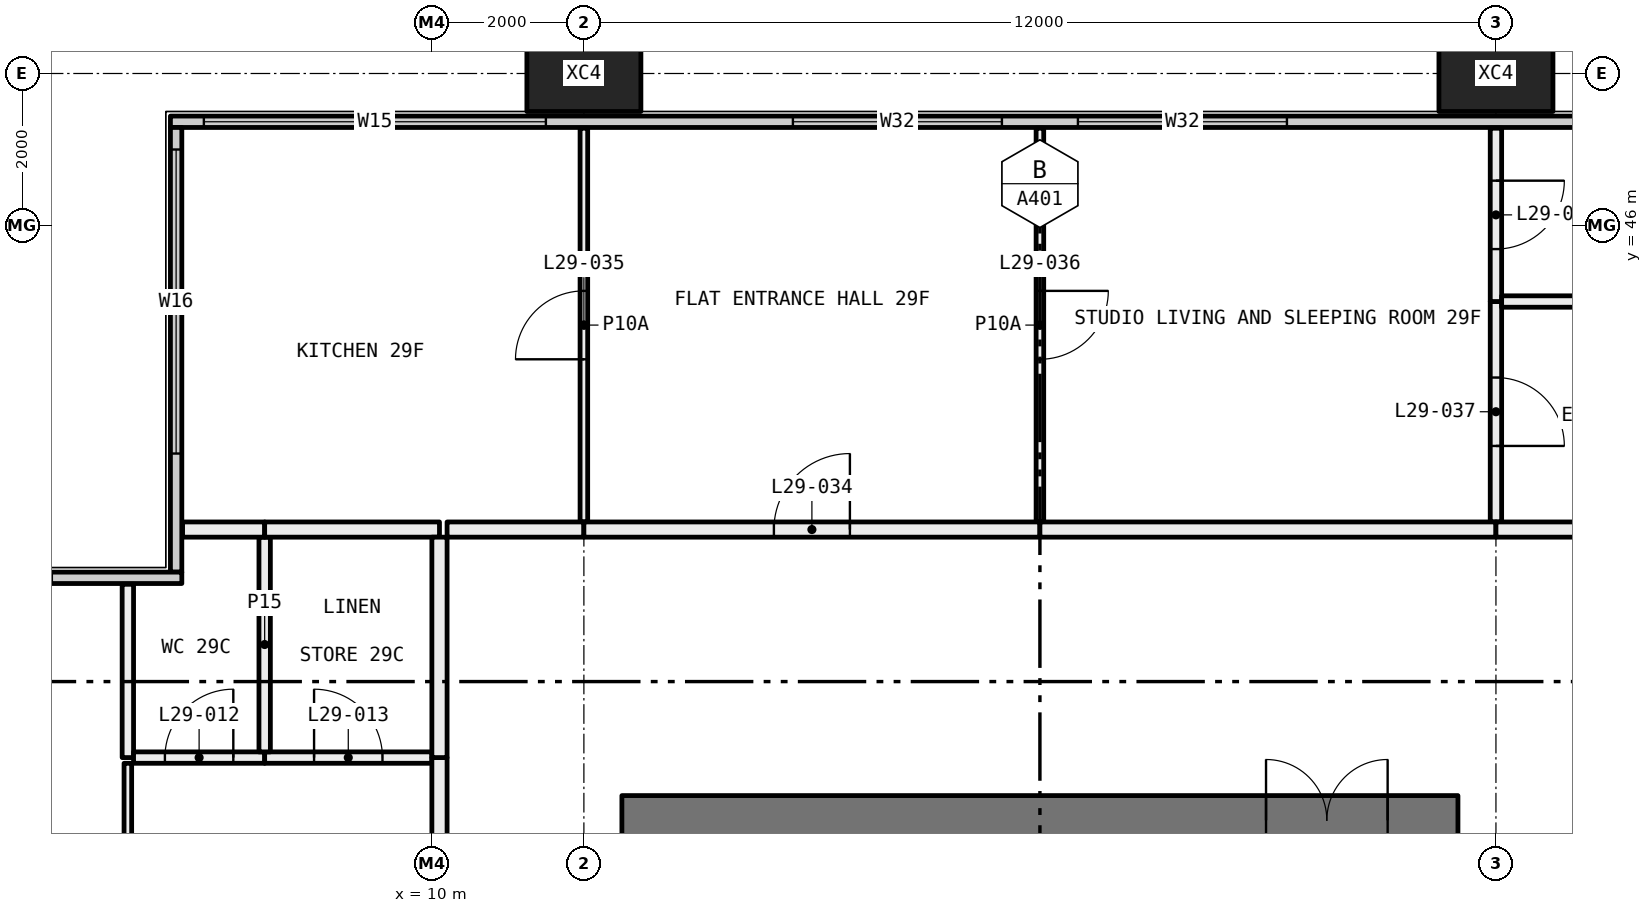
"""IFC4 building model, lengths in metres.
Left out: names, types, materials, properties, quantities, classifications, styles, units other than length and angle.
Written with IfcOpenShell. Run it as: python <this file> out.ifc"""

import sys

from ifc_helpers import new_model, si_unit, direction, frame, frame_2d, origin, origin_2d, place, context, subcontext, project, spatial, rectangle, hollow_rectangle, extrude, element, fill, save


model = new_model("IFC4")
c1 = context("Model", 3, precision=1e-05, world=origin(), true_north=direction((0.0, 1.0)))
c2 = subcontext(c1, "Body", "Model", "MODEL_VIEW")
j1 = project(units=[si_unit("LENGTHUNIT", "METRE"), si_unit("PLANEANGLEUNIT", "RADIAN")], contexts=[c1])
p1 = place(None, origin())
s1 = spatial("IfcSite", under=j1, at=p1, CompositionType="ELEMENT")
p2 = place(p1, origin())
s2 = spatial("IfcBuilding", under=s1, at=p2, CompositionType="ELEMENT")
p3 = place(p2, frame((0.0, 0.0, 113.85)))
s3 = spatial("IfcBuildingStorey", under=s2, at=p3, CompositionType="ELEMENT", Elevation=113.85)
for number, where, z_axis, x_axis in (
    (1, (12.0, 48.0, -0.4), (0.0, 0.0, 1.0), (1.0, 0.0, 0.0)),
    (2, (24.0, 48.0, -0.4), (0.0, 0.0, 1.0), (1.0, 0.0, 0.0)),
):
    element("IfcColumn", number, at=place(p3, frame(where, z_axis=z_axis, x_axis=x_axis)), inside=s3, PredefinedType="COLUMN", context=c2, shape_type="SweptSolid", body=[
        extrude(hollow_rectangle(XDim=1.5, YDim=1.0, WallThickness=0.06, at=origin_2d()), origin(), (0.0, 0.0, 1.0), 3.45),
    ])
p4 = place(p3, frame((6.56, 47.365, 0.0), z_axis=(0.0, 0.0, 1.0), x_axis=(1.0, 0.0, 0.0)))
e3 = element("IfcWall", 3, at=p4, inside=s3, PredefinedType="ELEMENTEDWALL", context=c2, shape_type="SweptSolid", body=[
    extrude(rectangle(XDim=58.88, YDim=0.15, at=frame_2d((29.44, 0.0))), origin(), (0.0, 0.0, 1.0), 3.05),
])
p5 = place(p4, frame((0.44, 0.0, 0.45)))
e4 = element("IfcOpeningElement", 4, at=p5, cuts=e3, PredefinedType="OPENING", context=c2, shape_type="SweptSolid", body=[
    extrude(rectangle(XDim=4.5, YDim=2.55, at=frame_2d((2.25, 1.275))), frame((0.0, 0.085, 0.0), z_axis=(0.0, -1.0, 0.0), x_axis=(1.0, 0.0, 0.0)), (0.0, 0.0, 1.0), 0.17),
])
p6 = place(p4, frame((8.19, 0.0, 0.45)))
e5 = element("IfcOpeningElement", 5, at=p6, cuts=e3, PredefinedType="OPENING", context=c2, shape_type="SweptSolid", body=[
    extrude(rectangle(XDim=2.75, YDim=2.55, at=frame_2d((1.375, 1.275))), frame((0.0, 0.085, 0.0), z_axis=(0.0, -1.0, 0.0), x_axis=(1.0, 0.0, 0.0)), (0.0, 0.0, 1.0), 0.17),
])
p7 = place(p4, frame((11.94, 0.0, 0.45)))
e6 = element("IfcOpeningElement", 6, at=p7, cuts=e3, PredefinedType="OPENING", context=c2, shape_type="SweptSolid", body=[
    extrude(rectangle(XDim=2.75, YDim=2.55, at=frame_2d((1.375, 1.275))), frame((0.0, 0.085, 0.0), z_axis=(0.0, -1.0, 0.0), x_axis=(1.0, 0.0, 0.0)), (0.0, 0.0, 1.0), 0.17),
])
p8 = place(p4, frame((20.19, 0.0, 0.45)))
e7 = element("IfcOpeningElement", 7, at=p8, cuts=e3, PredefinedType="OPENING", context=c2, shape_type="SweptSolid", body=[
    extrude(rectangle(XDim=2.75, YDim=2.55, at=frame_2d((1.375, 1.275))), frame((0.0, 0.085, 0.0), z_axis=(0.0, -1.0, 0.0), x_axis=(1.0, 0.0, 0.0)), (0.0, 0.0, 1.0), 0.17),
])
p9 = place(p4, frame((23.94, 0.0, 0.45)))
e8 = element("IfcOpeningElement", 8, at=p9, cuts=e3, PredefinedType="OPENING", context=c2, shape_type="SweptSolid", body=[
    extrude(rectangle(XDim=2.0, YDim=2.55, at=frame_2d((1.0, 1.275))), frame((0.0, 0.085, 0.0), z_axis=(0.0, -1.0, 0.0), x_axis=(1.0, 0.0, 0.0)), (0.0, 0.0, 1.0), 0.17),
])
p10 = place(p4, frame((32.19, 0.0, 0.45)))
e9 = element("IfcOpeningElement", 9, at=p10, cuts=e3, PredefinedType="OPENING", context=c2, shape_type="SweptSolid", body=[
    extrude(rectangle(XDim=2.75, YDim=2.55, at=frame_2d((1.375, 1.275))), frame((0.0, 0.085, 0.0), z_axis=(0.0, -1.0, 0.0), x_axis=(1.0, 0.0, 0.0)), (0.0, 0.0, 1.0), 0.17),
])
p11 = place(p4, frame((35.94, 0.0, 0.45)))
e10 = element("IfcOpeningElement", 10, at=p11, cuts=e3, PredefinedType="OPENING", context=c2, shape_type="SweptSolid", body=[
    extrude(rectangle(XDim=2.75, YDim=2.55, at=frame_2d((1.375, 1.275))), frame((0.0, 0.085, 0.0), z_axis=(0.0, -1.0, 0.0), x_axis=(1.0, 0.0, 0.0)), (0.0, 0.0, 1.0), 0.17),
])
p12 = place(p4, frame((44.19, 0.0, 0.45)))
e11 = element("IfcOpeningElement", 11, at=p12, cuts=e3, PredefinedType="OPENING", context=c2, shape_type="SweptSolid", body=[
    extrude(rectangle(XDim=2.75, YDim=2.55, at=frame_2d((1.375, 1.275))), frame((0.0, 0.085, 0.0), z_axis=(0.0, -1.0, 0.0), x_axis=(1.0, 0.0, 0.0)), (0.0, 0.0, 1.0), 0.17),
])
p13 = place(p4, frame((47.94, 0.0, 0.45)))
e12 = element("IfcOpeningElement", 12, at=p13, cuts=e3, PredefinedType="OPENING", context=c2, shape_type="SweptSolid", body=[
    extrude(rectangle(XDim=2.0, YDim=2.55, at=frame_2d((1.0, 1.275))), frame((0.0, 0.085, 0.0), z_axis=(0.0, -1.0, 0.0), x_axis=(1.0, 0.0, 0.0)), (0.0, 0.0, 1.0), 0.17),
])
p14 = place(p4, frame((53.94, 0.0, 0.45)))
e13 = element("IfcOpeningElement", 13, at=p14, cuts=e3, PredefinedType="OPENING", context=c2, shape_type="SweptSolid", body=[
    extrude(rectangle(XDim=4.5, YDim=2.55, at=frame_2d((2.25, 1.275))), frame((0.0, 0.085, 0.0), z_axis=(0.0, -1.0, 0.0), x_axis=(1.0, 0.0, 0.0)), (0.0, 0.0, 1.0), 0.17),
])
p15 = place(p3, frame((6.635, 41.44, 0.0), z_axis=(0.0, 0.0, 1.0), x_axis=(0.0, 1.0, 0.0)))
e14 = element("IfcWall", 14, at=p15, inside=s3, PredefinedType="ELEMENTEDWALL", context=c2, shape_type="SweptSolid", body=[
    extrude(rectangle(XDim=5.85, YDim=0.15, at=frame_2d((2.925, 0.0))), origin(), (0.0, 0.0, 1.0), 3.05),
])
p16 = place(p15, frame((1.56, 0.0, 0.45)))
e15 = element("IfcOpeningElement", 15, at=p16, cuts=e14, PredefinedType="OPENING", context=c2, shape_type="SweptSolid", body=[
    extrude(rectangle(XDim=4.0, YDim=2.55, at=frame_2d((2.0, 1.275))), frame((0.0, 0.085, 0.0), z_axis=(0.0, -1.0, 0.0), x_axis=(1.0, 0.0, 0.0)), (0.0, 0.0, 1.0), 0.17),
])
p17 = place(p3, frame((0.56, 41.365, 0.0), z_axis=(0.0, 0.0, 1.0), x_axis=(1.0, 0.0, 0.0)))
e16 = element("IfcWall", 16, at=p17, inside=s3, PredefinedType="ELEMENTEDWALL", context=c2, shape_type="SweptSolid", body=[
    extrude(rectangle(XDim=6.15, YDim=0.15, at=frame_2d((3.075, 0.0))), origin(), (0.0, 0.0, 1.0), 3.05),
])
p18 = place(p17, frame((0.44, 0.0, 0.45)))
e17 = element("IfcOpeningElement", 17, at=p18, cuts=e16, PredefinedType="OPENING", context=c2, shape_type="SweptSolid", body=[
    extrude(rectangle(XDim=4.0, YDim=2.55, at=frame_2d((2.0, 1.275))), frame((0.0, 0.085, 0.0), z_axis=(0.0, -1.0, 0.0), x_axis=(1.0, 0.0, 0.0)), (0.0, 0.0, 1.0), 0.17),
])
p19 = place(p3, frame((6.0, 36.05, 0.0), z_axis=(0.0, 0.0, 1.0), x_axis=(0.0, 1.0, 0.0)))
e18 = element("IfcWall", 18, at=p19, inside=s3, PredefinedType="PARTITIONING", context=c2, shape_type="SweptSolid", body=[
    extrude(rectangle(XDim=2.875, YDim=0.1, at=frame_2d((1.438, 0.0))), origin(), (0.0, 0.0, 1.0), 2.45),
])
p20 = place(p3, frame((6.0, 39.0, 0.0), z_axis=(0.0, 0.0, 1.0), x_axis=(0.0, 1.0, 0.0)))
e19 = element("IfcWall", 19, at=p20, inside=s3, PredefinedType="PARTITIONING", context=c2, shape_type="SweptSolid", body=[
    extrude(rectangle(XDim=2.28, YDim=0.15, at=frame_2d((1.14, 0.0))), origin(), (0.0, 0.0, 1.0), 3.05),
])
p21 = place(p3, frame((7.8, 39.0, 0.0), z_axis=(0.0, 0.0, 1.0), x_axis=(-1.0, 0.0, 0.0)))
e20 = element("IfcWall", 20, at=p21, inside=s3, PredefinedType="PARTITIONING", context=c2, shape_type="SweptSolid", body=[
    extrude(rectangle(XDim=1.725, YDim=0.15, at=frame_2d((0.863, 0.0))), origin(), (0.0, 0.0, 1.0), 3.05),
])
p22 = place(p21, frame((0.413, 0.0, 0.0)))
e21 = element("IfcOpeningElement", 21, at=p22, cuts=e20, PredefinedType="OPENING", context=c2, shape_type="SweptSolid", body=[
    extrude(rectangle(XDim=0.9, YDim=2.1, at=frame_2d((0.45, 1.05))), frame((0.0, 0.085, 0.0), z_axis=(0.0, -1.0, 0.0), x_axis=(1.0, 0.0, 0.0)), (0.0, 0.0, 1.0), 0.17),
])
p23 = place(p3, frame((10.0, 39.0, 0.0), z_axis=(0.0, 0.0, 1.0), x_axis=(-1.0, 0.0, 0.0)))
e22 = element("IfcWall", 22, at=p23, inside=s3, PredefinedType="PARTITIONING", context=c2, shape_type="SweptSolid", body=[
    extrude(rectangle(XDim=2.2, YDim=0.15, at=frame_2d((1.1, 0.0))), origin(), (0.0, 0.0, 1.0), 3.05),
])
p24 = place(p23, frame((0.65, 0.0, 0.0)))
e23 = element("IfcOpeningElement", 23, at=p24, cuts=e22, PredefinedType="OPENING", context=c2, shape_type="SweptSolid", body=[
    extrude(rectangle(XDim=0.9, YDim=2.1, at=frame_2d((0.45, 1.05))), frame((0.0, 0.085, 0.0), z_axis=(0.0, -1.0, 0.0), x_axis=(1.0, 0.0, 0.0)), (0.0, 0.0, 1.0), 0.17),
])
p25 = place(p3, frame((10.1, 36.1, 0.0), z_axis=(0.0, 0.0, 1.0), x_axis=(0.0, 1.0, 0.0)))
e24 = element("IfcWall", 24, at=p25, inside=s3, PredefinedType="PARTITIONING", context=c2, shape_type="SweptSolid", body=[
    extrude(rectangle(XDim=2.9, YDim=0.2, at=frame_2d((1.45, 0.0))), origin(), (0.0, 0.0, 1.0), 3.05),
])
p26 = place(p3, frame((7.8, 39.075, 0.0), z_axis=(0.0, 0.0, 1.0), x_axis=(0.0, 1.0, 0.0)))
e25 = element("IfcWall", 25, at=p26, inside=s3, PredefinedType="PARTITIONING", context=c2, shape_type="SweptSolid", body=[
    extrude(rectangle(XDim=2.825, YDim=0.15, at=frame_2d((1.413, 0.0))), origin(), (0.0, 0.0, 1.0), 3.05),
])
p27 = place(p3, frame((7.8, 42.0, 0.0), z_axis=(0.0, 0.0, 1.0), x_axis=(-1.0, 0.0, 0.0)))
e26 = element("IfcWall", 26, at=p27, inside=s3, PredefinedType="PARTITIONING", context=c2, shape_type="SweptSolid", body=[
    extrude(rectangle(XDim=1.08, YDim=0.2, at=frame_2d((0.54, 0.0))), origin(), (0.0, 0.0, 1.0), 3.05),
])
p28 = place(p3, frame((10.1, 42.0, 0.0), z_axis=(0.0, 0.0, 1.0), x_axis=(-1.0, 0.0, 0.0)))
e27 = element("IfcWall", 27, at=p28, inside=s3, PredefinedType="PARTITIONING", context=c2, shape_type="SweptSolid", body=[
    extrude(rectangle(XDim=2.3, YDim=0.2, at=frame_2d((1.15, 0.0))), origin(), (0.0, 0.0, 1.0), 3.05),
])
p29 = place(p3, frame((10.1, 39.0, 0.0), z_axis=(0.0, 0.0, 1.0), x_axis=(0.0, 1.0, 0.0)))
e28 = element("IfcWall", 28, at=p29, inside=s3, PredefinedType="PARTITIONING", context=c2, shape_type="SweptSolid", body=[
    extrude(rectangle(XDim=2.9, YDim=0.2, at=frame_2d((1.45, 0.0))), origin(), (0.0, 0.0, 1.0), 3.05),
])
p30 = place(p3, frame((12.0, 42.1, 0.0), z_axis=(0.0, 0.0, 1.0), x_axis=(0.0, 1.0, 0.0)))
e29 = element("IfcWall", 29, at=p30, inside=s3, PredefinedType="PARTITIONING", context=c2, shape_type="SweptSolid", body=[
    extrude(rectangle(XDim=5.18, YDim=0.1, at=frame_2d((2.59, 0.0))), origin(), (0.0, 0.0, 1.0), 3.05),
])
p31 = place(p30, frame((2.14, 0.0, 0.0)))
e30 = element("IfcOpeningElement", 30, at=p31, cuts=e29, PredefinedType="OPENING", context=c2, shape_type="SweptSolid", body=[
    extrude(rectangle(XDim=0.9, YDim=2.1, at=frame_2d((0.45, 1.05))), frame((0.0, 0.06, 0.0), z_axis=(0.0, -1.0, 0.0), x_axis=(1.0, 0.0, 0.0)), (0.0, 0.0, 1.0), 0.12),
])
p32 = place(p3, frame((10.2, 42.0, 0.0), z_axis=(0.0, 0.0, 1.0), x_axis=(1.0, 0.0, 0.0)))
e31 = element("IfcWall", 31, at=p32, inside=s3, PredefinedType="PARTITIONING", context=c2, shape_type="SweptSolid", body=[
    extrude(rectangle(XDim=1.8, YDim=0.2, at=frame_2d((0.9, 0.0))), origin(), (0.0, 0.0, 1.0), 3.05),
])
p33 = place(p3, frame((18.0, 42.1, 0.0), z_axis=(0.0, 0.0, 1.0), x_axis=(0.0, 1.0, 0.0)))
e32 = element("IfcWall", 32, at=p33, inside=s3, PredefinedType="PARTITIONING", context=c2, shape_type="SweptSolid", body=[
    extrude(rectangle(XDim=5.18, YDim=0.1, at=frame_2d((2.59, 0.0))), origin(), (0.0, 0.0, 1.0), 3.05),
])
p34 = place(p33, frame((2.14, 0.0, 0.0)))
e33 = element("IfcOpeningElement", 33, at=p34, cuts=e32, PredefinedType="OPENING", context=c2, shape_type="SweptSolid", body=[
    extrude(rectangle(XDim=0.9, YDim=2.1, at=frame_2d((0.45, 1.05))), frame((0.0, 0.06, 0.0), z_axis=(0.0, -1.0, 0.0), x_axis=(1.0, 0.0, 0.0)), (0.0, 0.0, 1.0), 0.12),
])
p35 = place(p3, frame((12.0, 42.0, 0.0), z_axis=(0.0, 0.0, 1.0), x_axis=(1.0, 0.0, 0.0)))
e34 = element("IfcWall", 34, at=p35, inside=s3, PredefinedType="PARTITIONING", context=c2, shape_type="SweptSolid", body=[
    extrude(rectangle(XDim=6.0, YDim=0.2, at=frame_2d((3.0, 0.0))), origin(), (0.0, 0.0, 1.0), 3.05),
])
p36 = place(p35, frame((2.5, 0.0, 0.0)))
e35 = element("IfcOpeningElement", 35, at=p36, cuts=e34, PredefinedType="OPENING", context=c2, shape_type="SweptSolid", body=[
    extrude(rectangle(XDim=1.0, YDim=2.1, at=frame_2d((0.5, 1.05))), frame((0.0, 0.11, 0.0), z_axis=(0.0, -1.0, 0.0), x_axis=(1.0, 0.0, 0.0)), (0.0, 0.0, 1.0), 0.22),
])
p37 = place(p3, frame((24.0, 42.1, 0.0), z_axis=(0.0, 0.0, 1.0), x_axis=(0.0, 1.0, 0.0)))
e36 = element("IfcWall", 36, at=p37, inside=s3, PredefinedType="PARTITIONING", context=c2, shape_type="SweptSolid", body=[
    extrude(rectangle(XDim=2.9, YDim=0.15, at=frame_2d((1.45, 0.0))), origin(), (0.0, 0.0, 1.0), 3.05),
])
p38 = place(p37, frame((1.0, 0.0, 0.0)))
e37 = element("IfcOpeningElement", 37, at=p38, cuts=e36, PredefinedType="OPENING", context=c2, shape_type="SweptSolid", body=[
    extrude(rectangle(XDim=0.9, YDim=2.1, at=frame_2d((0.45, 1.05))), frame((0.0, 0.085, 0.0), z_axis=(0.0, -1.0, 0.0), x_axis=(1.0, 0.0, 0.0)), (0.0, 0.0, 1.0), 0.17),
])
p39 = place(p3, frame((24.0, 45.0, 0.0), z_axis=(0.0, 0.0, 1.0), x_axis=(0.0, 1.0, 0.0)))
e38 = element("IfcWall", 38, at=p39, inside=s3, PredefinedType="PARTITIONING", context=c2, shape_type="SweptSolid", body=[
    extrude(rectangle(XDim=2.28, YDim=0.15, at=frame_2d((1.14, 0.0))), origin(), (0.0, 0.0, 1.0), 3.05),
])
p40 = place(p39, frame((0.69, 0.0, 0.0)))
e39 = element("IfcOpeningElement", 39, at=p40, cuts=e38, PredefinedType="OPENING", context=c2, shape_type="SweptSolid", body=[
    extrude(rectangle(XDim=0.9, YDim=2.1, at=frame_2d((0.45, 1.05))), frame((0.0, 0.085, 0.0), z_axis=(0.0, -1.0, 0.0), x_axis=(1.0, 0.0, 0.0)), (0.0, 0.0, 1.0), 0.17),
])
p41 = place(p3, frame((18.0, 42.0, 0.0), z_axis=(0.0, 0.0, 1.0), x_axis=(1.0, 0.0, 0.0)))
e40 = element("IfcWall", 40, at=p41, inside=s3, PredefinedType="PARTITIONING", context=c2, shape_type="SweptSolid", body=[
    extrude(rectangle(XDim=6.0, YDim=0.2, at=frame_2d((3.0, 0.0))), origin(), (0.0, 0.0, 1.0), 3.05),
])
p42 = place(p3, frame((29.9, 45.0, 0.0), z_axis=(0.0, 0.0, 1.0), x_axis=(-1.0, 0.0, 0.0)))
e41 = element("IfcWall", 41, at=p42, inside=s3, PredefinedType="PARTITIONING", context=c2, shape_type="SweptSolid", body=[
    extrude(rectangle(XDim=5.825, YDim=0.15, at=frame_2d((2.913, 0.0))), origin(), (0.0, 0.0, 1.0), 3.05),
])
p43 = place(p3, frame((24.0, 42.0, 0.0), z_axis=(0.0, 0.0, 1.0), x_axis=(1.0, 0.0, 0.0)))
e42 = element("IfcWall", 42, at=p43, inside=s3, PredefinedType="PARTITIONING", context=c2, shape_type="SweptSolid", body=[
    extrude(rectangle(XDim=1.9, YDim=0.2, at=frame_2d((0.95, 0.0))), origin(), (0.0, 0.0, 1.0), 3.05),
])
p44 = place(p3, frame((12.5, 38.175, 0.0), z_axis=(0.0, 0.0, 1.0), x_axis=(1.0, 0.0, 0.0)))
e43 = element("IfcWall", 43, at=p44, inside=s3, PredefinedType="SHEAR", context=c2, shape_type="SweptSolid", body=[
    extrude(rectangle(XDim=11.0, YDim=0.65, at=frame_2d((5.5, 0.0))), origin(), (0.0, 0.0, 1.0), 3.05),
])
p45 = place(p44, frame((8.475, 0.0, 0.0)))
e44 = element("IfcOpeningElement", 44, at=p45, cuts=e43, PredefinedType="OPENING", context=c2, shape_type="SweptSolid", body=[
    extrude(rectangle(XDim=1.6, YDim=2.1, at=frame_2d((0.8, 1.05))), frame((0.0, 0.335, 0.0), z_axis=(0.0, -1.0, 0.0), x_axis=(1.0, 0.0, 0.0)), (0.0, 0.0, 1.0), 0.67),
])
p46 = place(p5, origin())
e45 = element("IfcWindow", 45, at=p46, inside=s3, PartitioningType="SINGLE_PANEL", PredefinedType="WINDOW", context=c2, shape_type="SweptSolid", body=[
    extrude(rectangle(XDim=4.5, YDim=2.55, at=frame_2d((2.25, 1.275))), frame((0.0, 0.03, 0.0), z_axis=(0.0, -1.0, 0.0), x_axis=(1.0, 0.0, 0.0)), (0.0, 0.0, 1.0), 0.06),
])
fill(e4, e45)
p47 = place(p6, origin())
e46 = element("IfcWindow", 46, at=p47, inside=s3, PartitioningType="SINGLE_PANEL", PredefinedType="WINDOW", context=c2, shape_type="SweptSolid", body=[
    extrude(rectangle(XDim=2.75, YDim=2.55, at=frame_2d((1.375, 1.275))), frame((0.0, 0.03, 0.0), z_axis=(0.0, -1.0, 0.0), x_axis=(1.0, 0.0, 0.0)), (0.0, 0.0, 1.0), 0.06),
])
fill(e5, e46)
p48 = place(p7, origin())
e47 = element("IfcWindow", 47, at=p48, inside=s3, PartitioningType="SINGLE_PANEL", PredefinedType="WINDOW", context=c2, shape_type="SweptSolid", body=[
    extrude(rectangle(XDim=2.75, YDim=2.55, at=frame_2d((1.375, 1.275))), frame((0.0, 0.03, 0.0), z_axis=(0.0, -1.0, 0.0), x_axis=(1.0, 0.0, 0.0)), (0.0, 0.0, 1.0), 0.06),
])
fill(e6, e47)
p49 = place(p16, origin())
e48 = element("IfcWindow", 48, at=p49, inside=s3, PartitioningType="SINGLE_PANEL", PredefinedType="WINDOW", context=c2, shape_type="SweptSolid", body=[
    extrude(rectangle(XDim=4.0, YDim=2.55, at=frame_2d((2.0, 1.275))), frame((0.0, 0.03, 0.0), z_axis=(0.0, -1.0, 0.0), x_axis=(1.0, 0.0, 0.0)), (0.0, 0.0, 1.0), 0.06),
])
fill(e15, e48)
p50 = place(p22, frame((0.9, 0.0, 0.0), x_axis=(-1.0, 0.0, 0.0)))
e49 = element("IfcDoor", 49, at=p50, inside=s3, OperationType="SINGLE_SWING_LEFT", PredefinedType="DOOR", context=c2, shape_type="SweptSolid", body=[
    extrude(rectangle(XDim=0.9, YDim=2.1, at=frame_2d((0.45, 1.05))), frame((0.0, 0.025, 0.0), z_axis=(0.0, -1.0, 0.0), x_axis=(1.0, 0.0, 0.0)), (0.0, 0.0, 1.0), 0.05),
])
fill(e21, e49)
p51 = place(p24, frame((0.9, 0.0, 0.0), x_axis=(-1.0, 0.0, 0.0)))
e50 = element("IfcDoor", 50, at=p51, inside=s3, OperationType="SINGLE_SWING_RIGHT", PredefinedType="DOOR", context=c2, shape_type="SweptSolid", body=[
    extrude(rectangle(XDim=0.9, YDim=2.1, at=frame_2d((0.45, 1.05))), frame((0.0, 0.025, 0.0), z_axis=(0.0, -1.0, 0.0), x_axis=(1.0, 0.0, 0.0)), (0.0, 0.0, 1.0), 0.05),
])
fill(e23, e50)
p52 = place(p36, origin())
e51 = element("IfcDoor", 51, at=p52, inside=s3, OperationType="SINGLE_SWING_LEFT", PredefinedType="DOOR", context=c2, shape_type="SweptSolid", body=[
    extrude(rectangle(XDim=1.0, YDim=2.1, at=frame_2d((0.5, 1.05))), frame((0.0, 0.025, 0.0), z_axis=(0.0, -1.0, 0.0), x_axis=(1.0, 0.0, 0.0)), (0.0, 0.0, 1.0), 0.05),
])
fill(e35, e51)
p53 = place(p31, origin())
e52 = element("IfcDoor", 52, at=p53, inside=s3, OperationType="SINGLE_SWING_RIGHT", PredefinedType="DOOR", context=c2, shape_type="SweptSolid", body=[
    extrude(rectangle(XDim=0.9, YDim=2.1, at=frame_2d((0.45, 1.05))), frame((0.0, 0.025, 0.0), z_axis=(0.0, -1.0, 0.0), x_axis=(1.0, 0.0, 0.0)), (0.0, 0.0, 1.0), 0.05),
])
fill(e30, e52)
p54 = place(p34, frame((0.9, 0.0, 0.0), x_axis=(-1.0, 0.0, 0.0)))
e53 = element("IfcDoor", 53, at=p54, inside=s3, OperationType="SINGLE_SWING_RIGHT", PredefinedType="DOOR", context=c2, shape_type="SweptSolid", body=[
    extrude(rectangle(XDim=0.9, YDim=2.1, at=frame_2d((0.45, 1.05))), frame((0.0, 0.025, 0.0), z_axis=(0.0, -1.0, 0.0), x_axis=(1.0, 0.0, 0.0)), (0.0, 0.0, 1.0), 0.05),
])
fill(e33, e53)
p55 = place(p38, frame((0.9, 0.0, 0.0), x_axis=(-1.0, 0.0, 0.0)))
e54 = element("IfcDoor", 54, at=p55, inside=s3, OperationType="SINGLE_SWING_LEFT", PredefinedType="DOOR", context=c2, shape_type="SweptSolid", body=[
    extrude(rectangle(XDim=0.9, YDim=2.1, at=frame_2d((0.45, 1.05))), frame((0.0, 0.025, 0.0), z_axis=(0.0, -1.0, 0.0), x_axis=(1.0, 0.0, 0.0)), (0.0, 0.0, 1.0), 0.05),
])
fill(e37, e54)
p56 = place(p40, frame((0.9, 0.0, 0.0), x_axis=(-1.0, 0.0, 0.0)))
e55 = element("IfcDoor", 55, at=p56, inside=s3, OperationType="SINGLE_SWING_RIGHT", PredefinedType="DOOR", context=c2, shape_type="SweptSolid", body=[
    extrude(rectangle(XDim=0.9, YDim=2.1, at=frame_2d((0.45, 1.05))), frame((0.0, 0.025, 0.0), z_axis=(0.0, -1.0, 0.0), x_axis=(1.0, 0.0, 0.0)), (0.0, 0.0, 1.0), 0.05),
])
fill(e39, e55)
p57 = place(p45, origin())
e56 = element("IfcDoor", 56, at=p57, inside=s3, OperationType="DOUBLE_DOOR_SINGLE_SWING", PredefinedType="DOOR", context=c2, shape_type="SweptSolid", body=[
    extrude(rectangle(XDim=1.6, YDim=2.1, at=frame_2d((0.8, 1.05))), frame((0.0, 0.025, 0.0), z_axis=(0.0, -1.0, 0.0), x_axis=(1.0, 0.0, 0.0)), (0.0, 0.0, 1.0), 0.05),
])
fill(e44, e56)
save(model, sys.argv[1])
